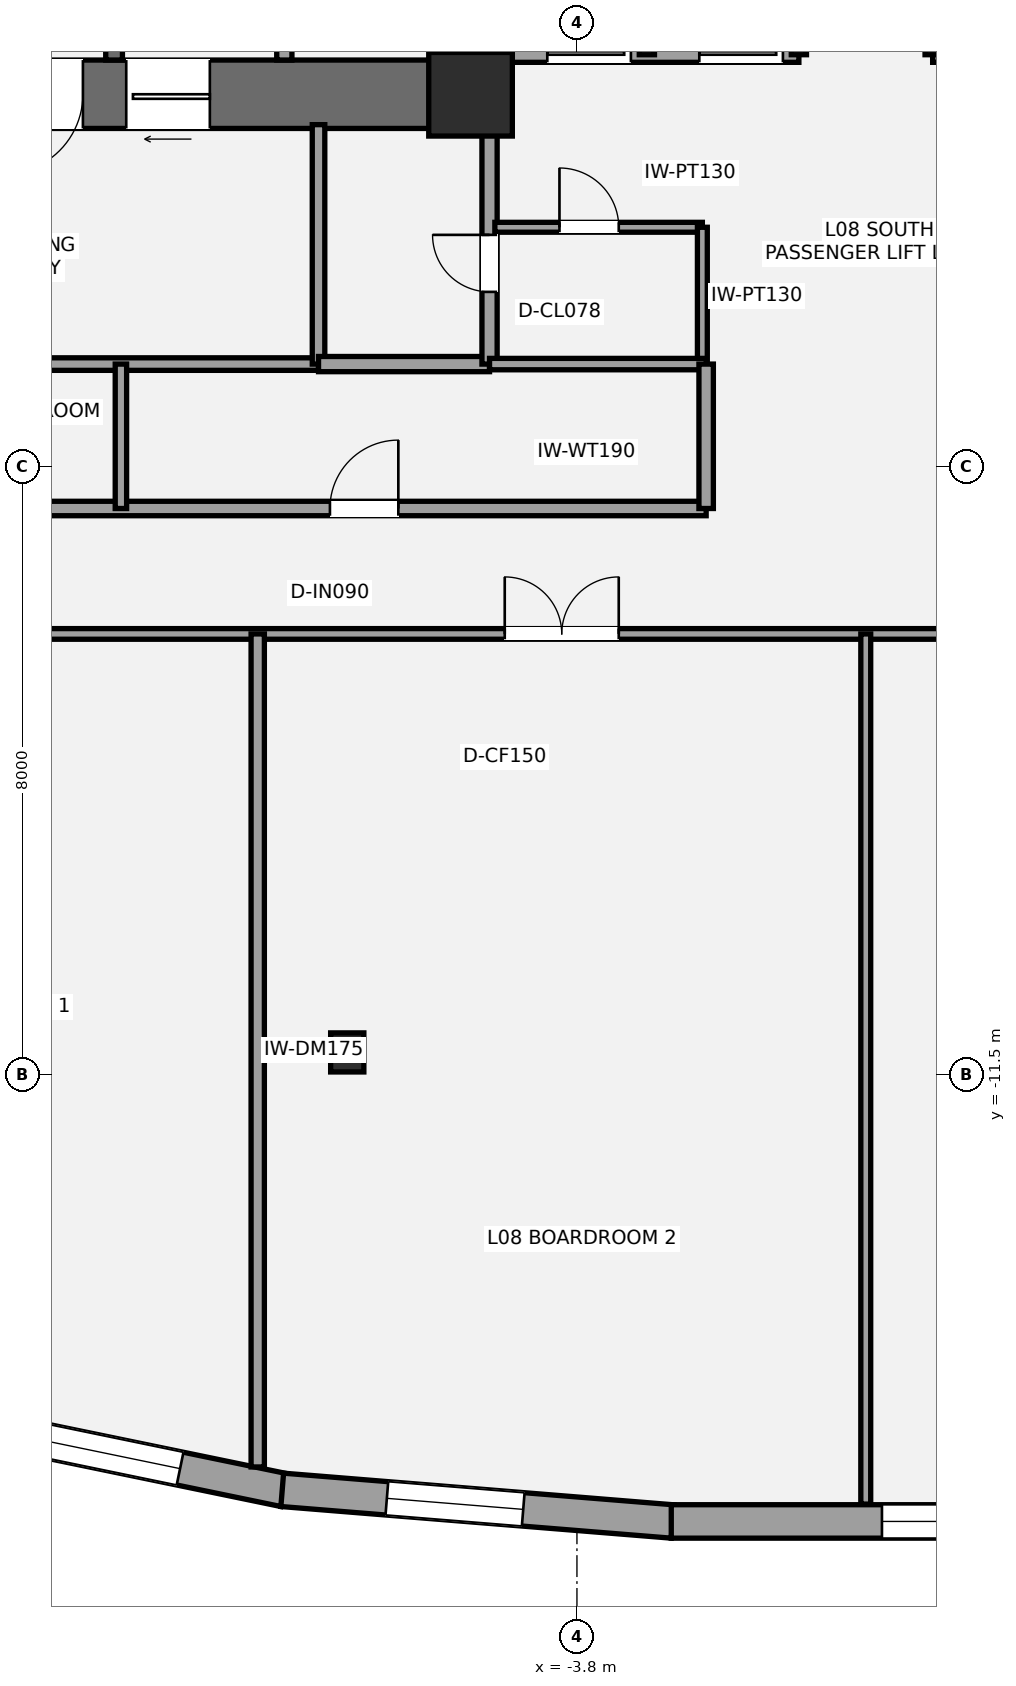
"""IFC4 building model, lengths in metres.
Left out: names, types, materials, properties, quantities, classifications, styles, units other than length and angle.
Written with IfcOpenShell. Run it as: python <this file> out.ifc"""

import sys

from ifc_helpers import new_model, si_unit, direction, frame, frame_2d, origin, origin_2d, place, context, subcontext, project, spatial, rectangle, i_section, extrude, element, fill, save


model = new_model("IFC4")
c1 = context("Model", 3, precision=1e-05, world=origin(), true_north=direction((0.0, 1.0)))
c2 = subcontext(c1, "Body", "Model", "MODEL_VIEW")
j1 = project(units=[si_unit("LENGTHUNIT", "METRE"), si_unit("PLANEANGLEUNIT", "RADIAN")], contexts=[c1])
p1 = place(None, origin())
s1 = spatial("IfcSite", under=j1, at=p1, CompositionType="ELEMENT")
p2 = place(p1, origin())
s2 = spatial("IfcBuilding", under=s1, at=p2, CompositionType="ELEMENT")
p3 = place(p2, frame((0.0, 0.0, 34.2)))
s3 = spatial("IfcBuildingStorey", under=s2, at=p3, CompositionType="ELEMENT", Elevation=34.2)
p4 = place(p3, frame((-4.75, 1.4, 0.0), z_axis=(0.0, 0.0, 1.0), x_axis=(-1.0, 0.0, 0.0)))
e1 = element("IfcWall", 1, at=p4, inside=s3, PredefinedType="SHEAR", context=c2, shape_type="SweptSolid", body=[
    extrude(rectangle(XDim=9.3, YDim=0.9, at=frame_2d((4.65, 0.0))), origin(), (0.0, 0.0, 1.0), 3.6),
])
p5 = place(p4, frame((5.55, 0.0, 0.0)))
e2 = element("IfcOpeningElement", 2, at=p5, cuts=e1, PredefinedType="OPENING", context=c2, shape_type="SweptSolid", body=[
    extrude(rectangle(XDim=1.05, YDim=2.15, at=frame_2d((0.525, 1.075))), frame((0.0, 0.46, 0.0), z_axis=(0.0, -1.0, 0.0), x_axis=(1.0, 0.0, 0.0)), (0.0, 0.0, 1.0), 0.92),
])
p6 = place(p4, frame((3.88, 0.0, 0.0)))
e3 = element("IfcOpeningElement", 3, at=p6, cuts=e1, PredefinedType="OPENING", context=c2, shape_type="SweptSolid", body=[
    extrude(rectangle(XDim=1.1, YDim=2.2, at=frame_2d((0.55, 1.1))), frame((0.0, 0.46, 0.0), z_axis=(0.0, -1.0, 0.0), x_axis=(1.0, 0.0, 0.0)), (0.0, 0.0, 1.0), 0.92),
])
p7 = place(p3, frame((-5.2, 0.95, 0.0), z_axis=(0.0, 0.0, 1.0), x_axis=(0.0, 1.0, 0.0)))
e4 = element("IfcWall", 4, at=p7, inside=s3, PredefinedType="SHEAR", context=c2, shape_type="SweptSolid", body=[
    extrude(rectangle(XDim=2.85, YDim=0.9, at=frame_2d((1.425, 0.0))), origin(), (0.0, 0.0, 1.0), 3.6),
])
p8 = place(p3, frame((-9.89, 1.85, 0.0), z_axis=(0.0, 0.0, 1.0), x_axis=(0.0, 1.0, 0.0)))
e5 = element("IfcWall", 5, at=p8, inside=s3, PredefinedType="SHEAR", context=c2, shape_type="SweptSolid", body=[
    extrude(rectangle(XDim=7.15, YDim=0.22, at=frame_2d((3.575, 0.0))), origin(), (0.0, 0.0, 1.0), 3.6),
])
p9 = place(p3, frame((-5.2, 1.4, 0.0), z_axis=(0.0, 0.0, 1.0), x_axis=(1.0, 0.0, 0.0)))
e6 = element("IfcColumn", 6, at=p9, inside=s3, PredefinedType="COLUMN", context=c2, shape_type="SweptSolid", body=[
    extrude(rectangle(XDim=1.1, YDim=1.1, at=origin_2d()), origin(), (0.0, 0.0, 1.0), 3.6),
])
p10 = place(p3, frame((-6.822, -11.206, 0.0), z_axis=(0.0, 0.0, 1.0), x_axis=(1.0, 0.0, 0.0)))
e7 = element("IfcColumn", 7, at=p10, inside=s3, PredefinedType="COLUMN", context=c2, shape_type="SweptSolid", body=[
    extrude(i_section(OverallWidth=0.437, OverallDepth=0.514, WebThickness=0.061, FlangeThickness=0.097, at=origin_2d()), origin(), (0.0, 0.0, 1.0), 3.6),
])
p11 = place(p3, frame((-7.651, -16.965, 0.0), z_axis=(0.0, 0.0, 1.0), x_axis=(-0.979349207435, 0.202175987437, 0.0)))
e8 = element("IfcWall", 8, at=p11, inside=s3, PredefinedType="STANDARD", context=c2, shape_type="SweptSolid", body=[
    extrude(rectangle(XDim=5.149, YDim=0.44, at=frame_2d((2.575, 0.0))), origin(), (0.0, 0.0, 1.0), 2.533),
])
p12 = place(p11, frame((1.4, 0.0, 0.65)))
e9 = element("IfcOpeningElement", 9, at=p12, cuts=e8, PredefinedType="OPENING", context=c2, shape_type="SweptSolid", body=[
    extrude(rectangle(XDim=1.8, YDim=1.7, at=frame_2d((0.9, 0.85))), frame((0.0, 0.23, 0.0), z_axis=(0.0, -1.0, 0.0), x_axis=(1.0, 0.0, 0.0)), (0.0, 0.0, 1.0), 0.46),
])
p13 = place(p3, frame((-2.541, -17.377, 0.0), z_axis=(0.0, 0.0, 1.0), x_axis=(-0.996732038622, 0.080778977367, 0.0)))
e10 = element("IfcWall", 10, at=p13, inside=s3, PredefinedType="STANDARD", context=c2, shape_type="SweptSolid", body=[
    extrude(rectangle(XDim=5.153, YDim=0.44, at=frame_2d((2.577, 0.0))), origin(), (0.0, 0.0, 1.0), 2.533),
])
p14 = place(p13, frame((1.972, 0.0, 0.65)))
e11 = element("IfcOpeningElement", 11, at=p14, cuts=e10, PredefinedType="OPENING", context=c2, shape_type="SweptSolid", body=[
    extrude(rectangle(XDim=1.8, YDim=1.7, at=frame_2d((0.9, 0.85))), frame((0.0, 0.23, 0.0), z_axis=(0.0, -1.0, 0.0), x_axis=(1.0, 0.0, 0.0)), (0.0, 0.0, 1.0), 0.46),
])
p15 = place(p3, frame((2.559, -17.376, 0.0), z_axis=(0.0, 0.0, 1.0), x_axis=(-1.0, 0.0, 0.0)))
e12 = element("IfcWall", 12, at=p15, inside=s3, PredefinedType="STANDARD", context=c2, shape_type="SweptSolid", body=[
    extrude(rectangle(XDim=5.118, YDim=0.44, at=frame_2d((2.559, 0.0))), origin(), (0.0, 0.0, 1.0), 2.533),
])
p16 = place(p15, frame((0.546, 0.0, 0.65)))
e13 = element("IfcOpeningElement", 13, at=p16, cuts=e12, PredefinedType="OPENING", context=c2, shape_type="SweptSolid", body=[
    extrude(rectangle(XDim=1.8, YDim=1.7, at=frame_2d((0.9, 0.85))), frame((0.0, 0.23, 0.0), z_axis=(0.0, -1.0, 0.0), x_axis=(1.0, 0.0, 0.0)), (0.0, 0.0, 1.0), 0.46),
])
p17 = place(p3, frame((-13.45, -2.15, 0.0), z_axis=(0.0, 0.0, 1.0), x_axis=(1.0, 0.0, 0.0)))
e14 = element("IfcWall", 14, at=p17, inside=s3, PredefinedType="PARTITIONING", context=c2, shape_type="SweptSolid", body=[
    extrude(rectangle(XDim=6.25, YDim=0.165, at=frame_2d((3.125, 0.0))), origin(), (0.0, 0.0, 1.0), 3.4),
])
p18 = place(p3, frame((-7.2, -2.15, 0.0), z_axis=(0.0, 0.0, 1.0), x_axis=(0.0, 1.0, 0.0)))
e15 = element("IfcWall", 15, at=p18, inside=s3, PredefinedType="PARTITIONING", context=c2, shape_type="SweptSolid", body=[
    extrude(rectangle(XDim=3.15, YDim=0.165, at=frame_2d((1.575, 0.0))), origin(), (0.0, 0.0, 1.0), 3.4),
])
p19 = place(p3, frame((-7.2, -2.15, 0.0), z_axis=(0.0, 0.0, 1.0), x_axis=(1.0, 0.0, 0.0)))
e16 = element("IfcWall", 16, at=p19, inside=s3, PredefinedType="SOLIDWALL", context=c2, shape_type="SweptSolid", body=[
    extrude(rectangle(XDim=2.25, YDim=0.2, at=frame_2d((1.125, 0.0))), origin(), (0.0, 0.0, 1.0), 3.4),
])
p20 = place(p3, frame((-4.95, -2.15, 0.0), z_axis=(0.0, 0.0, 1.0), x_axis=(0.0, 1.0, 0.0)))
e17 = element("IfcWall", 17, at=p20, inside=s3, PredefinedType="SOLIDWALL", context=c2, shape_type="SweptSolid", body=[
    extrude(rectangle(XDim=3.15, YDim=0.2, at=frame_2d((1.575, 0.0))), origin(), (0.0, 0.0, 1.0), 2.853),
])
p21 = place(p20, frame((0.95, 0.0, 0.0)))
e18 = element("IfcOpeningElement", 18, at=p21, cuts=e17, PredefinedType="OPENING", context=c2, shape_type="SweptSolid", body=[
    extrude(rectangle(XDim=0.75, YDim=2.1, at=frame_2d((0.375, 1.05))), frame((0.0, 0.11, 0.0), z_axis=(0.0, -1.0, 0.0), x_axis=(1.0, 0.0, 0.0)), (0.0, 0.0, 1.0), 0.22),
])
p22 = place(p3, frame((-4.88, -0.35, 0.0), z_axis=(0.0, 0.0, 1.0), x_axis=(1.0, 0.0, 0.0)))
e19 = element("IfcWall", 19, at=p22, inside=s3, PredefinedType="PARTITIONING", context=c2, shape_type="SweptSolid", body=[
    extrude(rectangle(XDim=2.73, YDim=0.13, at=frame_2d((1.365, 0.0))), origin(), (0.0, 0.0, 1.0), 2.853),
])
p23 = place(p22, frame((0.85, 0.0, 0.0)))
e20 = element("IfcOpeningElement", 20, at=p23, cuts=e19, PredefinedType="OPENING", context=c2, shape_type="SweptSolid", body=[
    extrude(rectangle(XDim=0.78, YDim=2.1, at=frame_2d((0.39, 1.05))), frame((0.0, 0.075, 0.0), z_axis=(0.0, -1.0, 0.0), x_axis=(1.0, 0.0, 0.0)), (0.0, 0.0, 1.0), 0.15),
])
p24 = place(p3, frame((-2.15, -2.15, 0.0), z_axis=(0.0, 0.0, 1.0), x_axis=(0.0, 1.0, 0.0)))
e21 = element("IfcWall", 21, at=p24, inside=s3, PredefinedType="PARTITIONING", context=c2, shape_type="SweptSolid", body=[
    extrude(rectangle(XDim=1.8, YDim=0.13, at=frame_2d((0.9, 0.0))), origin(), (0.0, 0.0, 1.0), 3.4),
])
p25 = place(p3, frame((-7.65, 1.85, 0.0), z_axis=(0.0, 0.0, 1.0), x_axis=(0.0, 1.0, 0.0)))
e22 = element("IfcWall", 22, at=p25, inside=s3, PredefinedType="SOLIDWALL", context=c2, shape_type="SweptSolid", body=[
    extrude(rectangle(XDim=1.93, YDim=0.2, at=frame_2d((0.965, 0.0))), origin(), (0.0, 0.0, 1.0), 3.4),
])
p26 = place(p3, frame((-4.74, 1.92, 0.0), z_axis=(0.0, 0.0, 1.0), x_axis=(1.0, 0.0, 0.0)))
e23 = element("IfcWall", 23, at=p26, inside=s3, PredefinedType="SOLIDWALL", context=c2, shape_type="SweptSolid", body=[
    extrude(rectangle(XDim=3.86, YDim=0.2, at=frame_2d((1.93, 0.0))), origin(), (0.0, 0.0, 1.0), 2.39),
])
p27 = place(p26, frame((0.55, 0.0, 0.0)))
e24 = element("IfcOpeningElement", 24, at=p27, cuts=e23, PredefinedType="OPENING", context=c2, shape_type="SweptSolid", body=[
    extrude(rectangle(XDim=1.1, YDim=2.2, at=frame_2d((0.55, 1.1))), frame((0.0, 0.11, 0.0), z_axis=(0.0, -1.0, 0.0), x_axis=(1.0, 0.0, 0.0)), (0.0, 0.0, 1.0), 0.22),
])
p28 = place(p26, frame((2.55, 0.0, 0.0)))
e25 = element("IfcOpeningElement", 25, at=p28, cuts=e23, PredefinedType="OPENING", context=c2, shape_type="SweptSolid", body=[
    extrude(rectangle(XDim=1.1, YDim=2.2, at=frame_2d((0.55, 1.1))), frame((0.0, 0.11, 0.0), z_axis=(0.0, -1.0, 0.0), x_axis=(1.0, 0.0, 0.0)), (0.0, 0.0, 1.0), 0.22),
])
p29 = place(p3, frame((0.88, 1.92, 0.0), z_axis=(0.0, 0.0, 1.0), x_axis=(1.0, 0.0, 0.0)))
e26 = element("IfcWall", 26, at=p29, inside=s3, PredefinedType="SOLIDWALL", context=c2, shape_type="SweptSolid", body=[
    extrude(rectangle(XDim=3.86, YDim=0.2, at=frame_2d((1.93, 0.0))), origin(), (0.0, 0.0, 1.0), 2.39),
])
p30 = place(p29, frame((0.55, 0.0, 0.0)))
e27 = element("IfcOpeningElement", 27, at=p30, cuts=e26, PredefinedType="OPENING", context=c2, shape_type="SweptSolid", body=[
    extrude(rectangle(XDim=1.1, YDim=2.2, at=frame_2d((0.55, 1.1))), frame((0.0, 0.11, 0.0), z_axis=(0.0, -1.0, 0.0), x_axis=(1.0, 0.0, 0.0)), (0.0, 0.0, 1.0), 0.22),
])
p31 = place(p29, frame((2.55, 0.0, 0.0)))
e28 = element("IfcOpeningElement", 28, at=p31, cuts=e26, PredefinedType="OPENING", context=c2, shape_type="SweptSolid", body=[
    extrude(rectangle(XDim=1.1, YDim=2.2, at=frame_2d((0.55, 1.1))), frame((0.0, 0.11, 0.0), z_axis=(0.0, -1.0, 0.0), x_axis=(1.0, 0.0, 0.0)), (0.0, 0.0, 1.0), 0.22),
])
for number, where, z_axis, x_axis in (
    (29, (-2.88, 1.92, 0.0), (0.0, 0.0, 1.0), (0.0, 1.0, 0.0)),
    (30, (-0.88, 1.92, 0.0), (0.0, 0.0, 1.0), (0.0, 1.0, 0.0)),
    (31, (0.88, 1.92, 0.0), (0.0, 0.0, 1.0), (0.0, 1.0, 0.0)),
):
    element("IfcWall", number, at=place(p3, frame(where, z_axis=z_axis, x_axis=x_axis)), inside=s3, PredefinedType="SOLIDWALL", context=c2, shape_type="SweptSolid", body=[
        extrude(rectangle(XDim=1.82, YDim=0.2, at=frame_2d((0.91, 0.0))), origin(), (0.0, 0.0, 1.0), 3.4),
    ])
p32 = place(p3, frame((-13.45, -4.05, 0.0), z_axis=(0.0, 0.0, 1.0), x_axis=(1.0, 0.0, 0.0)))
e32 = element("IfcWall", 32, at=p32, inside=s3, PredefinedType="PLUMBINGWALL", context=c2, shape_type="SweptSolid", body=[
    extrude(rectangle(XDim=11.35, YDim=0.19, at=frame_2d((5.675, 0.0))), origin(), (0.0, 0.0, 1.0), 2.933),
])
p33 = place(p32, frame((1.25, 0.0, 0.0)))
e33 = element("IfcOpeningElement", 33, at=p33, cuts=e32, PredefinedType="OPENING", context=c2, shape_type="SweptSolid", body=[
    extrude(rectangle(XDim=0.95, YDim=2.15, at=frame_2d((0.475, 1.075))), frame((0.0, 0.105, 0.0), z_axis=(0.0, -1.0, 0.0), x_axis=(1.0, 0.0, 0.0)), (0.0, 0.0, 1.0), 0.21),
])
p34 = place(p32, frame((6.4, 0.0, 0.0)))
e34 = element("IfcOpeningElement", 34, at=p34, cuts=e32, PredefinedType="OPENING", context=c2, shape_type="SweptSolid", body=[
    extrude(rectangle(XDim=0.9, YDim=2.1, at=frame_2d((0.45, 1.05))), frame((0.0, 0.105, 0.0), z_axis=(0.0, -1.0, 0.0), x_axis=(1.0, 0.0, 0.0)), (0.0, 0.0, 1.0), 0.21),
])
p35 = place(p3, frame((-4.95, -2.15, 0.0), z_axis=(0.0, 0.0, 1.0), x_axis=(1.0, 0.0, 0.0)))
e35 = element("IfcWall", 35, at=p35, inside=s3, PredefinedType="PLUMBINGWALL", context=c2, shape_type="SweptSolid", body=[
    extrude(rectangle(XDim=2.85, YDim=0.15, at=frame_2d((1.425, 0.0))), origin(), (0.0, 0.0, 1.0), 3.4),
])
p36 = place(p3, frame((-2.1, -4.05, 0.0), z_axis=(0.0, 0.0, 1.0), x_axis=(0.0, 1.0, 0.0)))
e36 = element("IfcWall", 36, at=p36, inside=s3, PredefinedType="PLUMBINGWALL", context=c2, shape_type="SweptSolid", body=[
    extrude(rectangle(XDim=1.9, YDim=0.19, at=frame_2d((0.95, 0.0))), origin(), (0.0, 0.0, 1.0), 2.853),
])
p37 = place(p3, frame((-9.8, -4.05, 0.0), z_axis=(0.0, 0.0, 1.0), x_axis=(0.0, 1.0, 0.0)))
e37 = element("IfcWall", 37, at=p37, inside=s3, PredefinedType="PLUMBINGWALL", context=c2, shape_type="SweptSolid", body=[
    extrude(rectangle(XDim=1.9, YDim=0.15, at=frame_2d((0.95, 0.0))), origin(), (0.0, 0.0, 1.0), 3.4),
])
p38 = place(p3, frame((-16.1, -5.7, 0.0), z_axis=(0.0, 0.0, 1.0), x_axis=(1.0, 0.0, 0.0)))
e38 = element("IfcWall", 38, at=p38, inside=s3, PredefinedType="PARTITIONING", context=c2, shape_type="SweptSolid", body=[
    extrude(rectangle(XDim=32.2, YDim=0.14, at=frame_2d((16.1, 0.0))), origin(), (0.0, 0.0, 1.0), 2.853),
])
p39 = place(p38, frame((3.6, 0.0, 0.0)))
e39 = element("IfcOpeningElement", 39, at=p39, cuts=e38, PredefinedType="OPENING", context=c2, shape_type="SweptSolid", body=[
    extrude(rectangle(XDim=0.9, YDim=2.1, at=frame_2d((0.45, 1.05))), frame((0.0, 0.08, 0.0), z_axis=(0.0, -1.0, 0.0), x_axis=(1.0, 0.0, 0.0)), (0.0, 0.0, 1.0), 0.16),
])
p40 = place(p38, frame((11.35, 0.0, 0.0)))
e40 = element("IfcOpeningElement", 40, at=p40, cuts=e38, PredefinedType="OPENING", context=c2, shape_type="SweptSolid", body=[
    extrude(rectangle(XDim=1.5, YDim=2.15, at=frame_2d((0.75, 1.075))), frame((0.0, 0.08, 0.0), z_axis=(0.0, -1.0, 0.0), x_axis=(1.0, 0.0, 0.0)), (0.0, 0.0, 1.0), 0.16),
])
p41 = place(p38, frame((19.65, 0.0, 0.0)))
e41 = element("IfcOpeningElement", 41, at=p41, cuts=e38, PredefinedType="OPENING", context=c2, shape_type="SweptSolid", body=[
    extrude(rectangle(XDim=0.9, YDim=2.1, at=frame_2d((0.45, 1.05))), frame((0.0, 0.08, 0.0), z_axis=(0.0, -1.0, 0.0), x_axis=(1.0, 0.0, 0.0)), (0.0, 0.0, 1.0), 0.16),
])
p42 = place(p38, frame((27.7, 0.0, 0.0)))
e42 = element("IfcOpeningElement", 42, at=p42, cuts=e38, PredefinedType="OPENING", context=c2, shape_type="SweptSolid", body=[
    extrude(rectangle(XDim=0.9, YDim=2.1, at=frame_2d((0.45, 1.05))), frame((0.0, 0.08, 0.0), z_axis=(0.0, -1.0, 0.0), x_axis=(1.0, 0.0, 0.0)), (0.0, 0.0, 1.0), 0.16),
])
p43 = place(p3, frame((-8.0, -16.66, 0.0), z_axis=(0.0, 0.0, 1.0), x_axis=(0.0, 1.0, 0.0)))
e43 = element("IfcWall", 43, at=p43, inside=s3, PredefinedType="PARTITIONING", context=c2, shape_type="SweptSolid", body=[
    extrude(rectangle(XDim=10.96, YDim=0.175, at=frame_2d((5.48, 0.0))), origin(), (0.0, 0.0, 1.0), 2.853),
])
p44 = place(p3, frame((0.0, -17.148, 0.0), z_axis=(0.0, 0.0, 1.0), x_axis=(0.0, 1.0, 0.0)))
e44 = element("IfcWall", 44, at=p44, inside=s3, PredefinedType="PARTITIONING", context=c2, shape_type="SweptSolid", body=[
    extrude(rectangle(XDim=11.448, YDim=0.13, at=frame_2d((5.724, 0.0))), origin(), (0.0, 0.0, 1.0), 2.853),
])
p45 = place(p12, origin())
e45 = element("IfcWindow", 45, at=p45, inside=s3, PartitioningType="SINGLE_PANEL", PredefinedType="WINDOW", context=c2, shape_type="SweptSolid", body=[
    extrude(rectangle(XDim=1.8, YDim=1.7, at=frame_2d((0.9, 0.85))), frame((0.0, -0.01, 0.0), z_axis=(0.0, -1.0, 0.0), x_axis=(1.0, 0.0, 0.0)), (0.0, 0.0, 1.0), 0.06),
])
fill(e9, e45)
p46 = place(p14, origin())
e46 = element("IfcWindow", 46, at=p46, inside=s3, PartitioningType="SINGLE_PANEL", PredefinedType="WINDOW", context=c2, shape_type="SweptSolid", body=[
    extrude(rectangle(XDim=1.8, YDim=1.7, at=frame_2d((0.9, 0.85))), frame((0.0, -0.01, 0.0), z_axis=(0.0, -1.0, 0.0), x_axis=(1.0, 0.0, 0.0)), (0.0, 0.0, 1.0), 0.06),
])
fill(e11, e46)
p47 = place(p16, origin())
e47 = element("IfcWindow", 47, at=p47, inside=s3, PartitioningType="SINGLE_PANEL", PredefinedType="WINDOW", context=c2, shape_type="SweptSolid", body=[
    extrude(rectangle(XDim=1.8, YDim=1.7, at=frame_2d((0.9, 0.85))), frame((0.0, -0.01, 0.0), z_axis=(0.0, -1.0, 0.0), x_axis=(1.0, 0.0, 0.0)), (0.0, 0.0, 1.0), 0.06),
])
fill(e13, e47)
p48 = place(p5, origin())
e48 = element("IfcDoor", 48, at=p48, inside=s3, OperationType="SINGLE_SWING_RIGHT", PredefinedType="DOOR", context=c2, shape_type="SweptSolid", body=[
    extrude(rectangle(XDim=1.05, YDim=2.15, at=frame_2d((0.525, 1.075))), frame((0.0, 0.025, 0.0), z_axis=(0.0, -1.0, 0.0), x_axis=(1.0, 0.0, 0.0)), (0.0, 0.0, 1.0), 0.05),
])
fill(e2, e48)
p49 = place(p21, origin())
e49 = element("IfcDoor", 49, at=p49, inside=s3, OperationType="SINGLE_SWING_RIGHT", PredefinedType="DOOR", context=c2, shape_type="SweptSolid", body=[
    extrude(rectangle(XDim=0.75, YDim=2.1, at=frame_2d((0.375, 1.05))), frame((0.0, 0.025, 0.0), z_axis=(0.0, -1.0, 0.0), x_axis=(1.0, 0.0, 0.0)), (0.0, 0.0, 1.0), 0.05),
])
fill(e18, e49)
p50 = place(p23, origin())
e50 = element("IfcDoor", 50, at=p50, inside=s3, OperationType="SINGLE_SWING_LEFT", PredefinedType="DOOR", context=c2, shape_type="SweptSolid", body=[
    extrude(rectangle(XDim=0.78, YDim=2.1, at=frame_2d((0.39, 1.05))), frame((0.0, 0.025, 0.0), z_axis=(0.0, -1.0, 0.0), x_axis=(1.0, 0.0, 0.0)), (0.0, 0.0, 1.0), 0.05),
])
fill(e20, e50)
p51 = place(p6, origin())
e51 = element("IfcDoor", 51, at=p51, inside=s3, OperationType="SLIDING_TO_LEFT", PredefinedType="DOOR", context=c2, shape_type="SweptSolid", body=[
    extrude(rectangle(XDim=1.1, YDim=2.2, at=frame_2d((0.55, 1.1))), frame((0.0, 0.025, 0.0), z_axis=(0.0, -1.0, 0.0), x_axis=(1.0, 0.0, 0.0)), (0.0, 0.0, 1.0), 0.05),
])
fill(e3, e51)
p52 = place(p27, origin())
e52 = element("IfcDoor", 52, at=p52, inside=s3, OperationType="SLIDING_TO_LEFT", PredefinedType="DOOR", context=c2, shape_type="SweptSolid", body=[
    extrude(rectangle(XDim=1.1, YDim=2.2, at=frame_2d((0.55, 1.1))), frame((0.0, 0.025, 0.0), z_axis=(0.0, -1.0, 0.0), x_axis=(1.0, 0.0, 0.0)), (0.0, 0.0, 1.0), 0.05),
])
fill(e24, e52)
p53 = place(p28, origin())
e53 = element("IfcDoor", 53, at=p53, inside=s3, OperationType="SLIDING_TO_LEFT", PredefinedType="DOOR", context=c2, shape_type="SweptSolid", body=[
    extrude(rectangle(XDim=1.1, YDim=2.2, at=frame_2d((0.55, 1.1))), frame((0.0, 0.025, 0.0), z_axis=(0.0, -1.0, 0.0), x_axis=(1.0, 0.0, 0.0)), (0.0, 0.0, 1.0), 0.05),
])
fill(e25, e53)
p54 = place(p34, origin())
e54 = element("IfcDoor", 54, at=p54, inside=s3, OperationType="SINGLE_SWING_RIGHT", PredefinedType="DOOR", context=c2, shape_type="SweptSolid", body=[
    extrude(rectangle(XDim=0.9, YDim=2.1, at=frame_2d((0.45, 1.05))), frame((0.0, 0.025, 0.0), z_axis=(0.0, -1.0, 0.0), x_axis=(1.0, 0.0, 0.0)), (0.0, 0.0, 1.0), 0.05),
])
fill(e34, e54)
p55 = place(p40, origin())
e55 = element("IfcDoor", 55, at=p55, inside=s3, OperationType="DOUBLE_DOOR_SINGLE_SWING", PredefinedType="DOOR", context=c2, shape_type="SweptSolid", body=[
    extrude(rectangle(XDim=1.5, YDim=2.15, at=frame_2d((0.75, 1.075))), frame((0.0, 0.025, 0.0), z_axis=(0.0, -1.0, 0.0), x_axis=(1.0, 0.0, 0.0)), (0.0, 0.0, 1.0), 0.05),
])
fill(e40, e55)
save(model, sys.argv[1])
